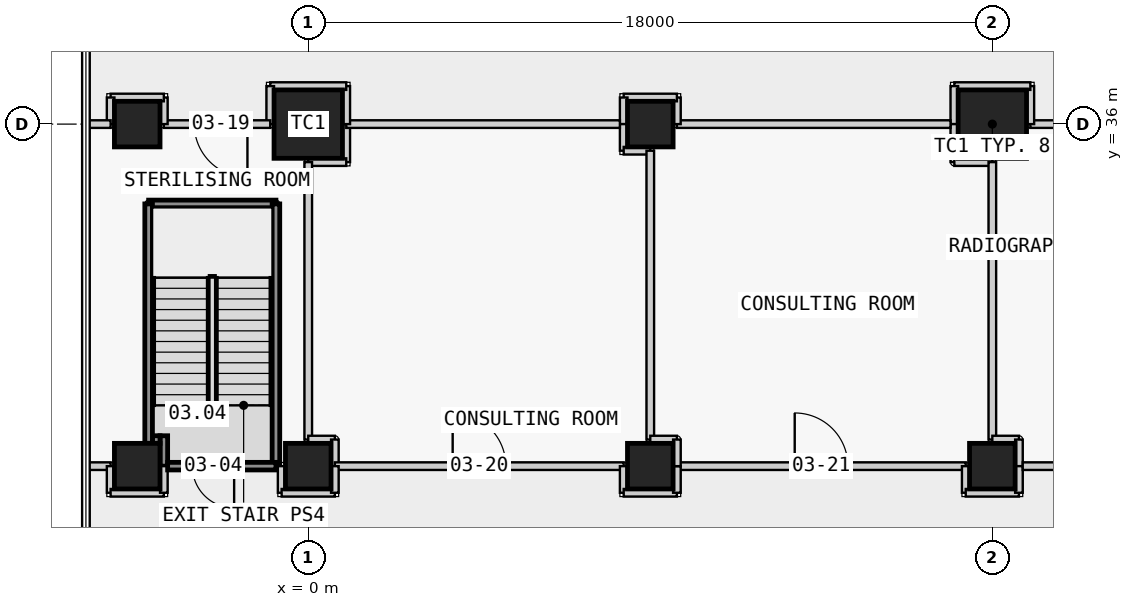
"""IFC4 building model, lengths in metres.
Left out: names, types, materials, properties, quantities, classifications, styles, units other than length and angle.
Written with IfcOpenShell. Run it as: python <this file> out.ifc"""

import sys

from ifc_helpers import new_model, si_unit, direction, frame, frame_2d, origin, origin_2d, place, context, subcontext, project, spatial, rectangle, extrude, element, fill, save


model = new_model("IFC4")
c1 = context("Model", 3, precision=1e-05, world=origin(), true_north=direction((0.0, 1.0)))
c2 = subcontext(c1, "Body", "Model", "MODEL_VIEW")
j1 = project(units=[si_unit("LENGTHUNIT", "METRE"), si_unit("PLANEANGLEUNIT", "RADIAN")], contexts=[c1])
p1 = place(None, origin())
s1 = spatial("IfcSite", under=j1, at=p1, CompositionType="ELEMENT")
p2 = place(p1, origin())
s2 = spatial("IfcBuilding", under=s1, at=p2, CompositionType="ELEMENT")
p3 = place(p2, frame((0.0, 0.0, 17.3)))
s3 = spatial("IfcBuildingStorey", under=s2, at=p3, CompositionType="ELEMENT", Elevation=17.3)
for number, where, z_axis, x_axis in (
    (1, (-4.5, 27.0, 0.0), (0.0, 0.0, 1.0), (1.0, 0.0, 0.0)),
    (2, (-4.5, 36.0, 0.0), (0.0, 0.0, 1.0), (1.0, 0.0, 0.0)),
    (3, (0.0, 27.0, 0.0), (0.0, 0.0, 1.0), (1.0, 0.0, 0.0)),
):
    element("IfcColumn", number, at=place(p3, frame(where, z_axis=z_axis, x_axis=x_axis)), inside=s3, PredefinedType="COLUMN", context=c2, shape_type="SweptSolid", body=[
        extrude(rectangle(XDim=1.2, YDim=1.2, at=origin_2d()), origin(), (0.0, 0.0, 1.0), 4.5),
    ])
p4 = place(p3, frame((0.0, 36.0, 0.0), z_axis=(0.0, 0.0, 1.0), x_axis=(1.0, 0.0, 0.0)))
e4 = element("IfcColumn", 4, at=p4, inside=s3, PredefinedType="COLUMN", context=c2, shape_type="SweptSolid", body=[
    extrude(rectangle(XDim=1.8, YDim=1.8, at=origin_2d()), origin(), (0.0, 0.0, 1.0), 4.5),
])
for number, where, z_axis, x_axis in (
    (5, (9.0, 27.0, 0.0), (0.0, 0.0, 1.0), (1.0, 0.0, 0.0)),
    (6, (9.0, 36.0, 0.0), (0.0, 0.0, 1.0), (1.0, 0.0, 0.0)),
    (7, (18.0, 27.0, 0.0), (0.0, 0.0, 1.0), (1.0, 0.0, 0.0)),
):
    element("IfcColumn", number, at=place(p3, frame(where, z_axis=z_axis, x_axis=x_axis)), inside=s3, PredefinedType="COLUMN", context=c2, shape_type="SweptSolid", body=[
        extrude(rectangle(XDim=1.2, YDim=1.2, at=origin_2d()), origin(), (0.0, 0.0, 1.0), 4.5),
    ])
p5 = place(p3, frame((18.0, 36.0, 0.0), z_axis=(0.0, 0.0, 1.0), x_axis=(1.0, 0.0, 0.0)))
e8 = element("IfcColumn", 8, at=p5, inside=s3, PredefinedType="COLUMN", context=c2, shape_type="SweptSolid", body=[
    extrude(rectangle(XDim=1.8, YDim=1.8, at=origin_2d()), origin(), (0.0, 0.0, 1.0), 4.5),
])
p6 = place(p3, frame((26.3, 36.0, 0.0), z_axis=(0.0, 0.0, 1.0), x_axis=(-1.0, 0.0, 0.0)))
e9 = element("IfcWall", 9, at=p6, inside=s3, PredefinedType="PARTITIONING", context=c2, shape_type="SweptSolid", body=[
    extrude(rectangle(XDim=7.3, YDim=0.2, at=frame_2d((3.65, 0.0))), origin(), (0.0, 0.0, 1.0), 4.15),
])
p7 = place(p6, frame((2.85, 0.0, 0.0)))
e10 = element("IfcOpeningElement", 10, at=p7, cuts=e9, PredefinedType="OPENING", context=c2, shape_type="SweptSolid", body=[
    extrude(rectangle(XDim=1.4, YDim=2.1, at=frame_2d((0.7, 1.05))), frame((0.0, 0.11, 0.0), z_axis=(0.0, -1.0, 0.0), x_axis=(1.0, 0.0, 0.0)), (0.0, 0.0, 1.0), 0.22),
])
p8 = place(p3, frame((19.0, 36.0, 0.0), z_axis=(0.0, 0.0, 1.0), x_axis=(0.0, 1.0, 0.0)))
e11 = element("IfcWall", 11, at=p8, inside=s3, PredefinedType="PARTITIONING", context=c2, shape_type="SweptSolid", body=[
    extrude(rectangle(XDim=1.0, YDim=0.2, at=frame_2d((0.5, 0.0))), origin(), (0.0, 0.0, 1.0), 4.15),
])
p9 = place(p3, frame((19.0, 37.0, 0.0), z_axis=(0.0, 0.0, 1.0), x_axis=(-1.0, 0.0, 0.0)))
e12 = element("IfcWall", 12, at=p9, inside=s3, PredefinedType="PARTITIONING", context=c2, shape_type="SweptSolid", body=[
    extrude(rectangle(XDim=2.0, YDim=0.2, at=frame_2d((1.0, 0.0))), origin(), (0.0, 0.0, 1.0), 4.15),
])
for number, where, z_axis, x_axis in (
    (13, (17.0, 37.0, 0.0), (0.0, 0.0, 1.0), (0.0, -1.0, 0.0)),
    (14, (17.0, 36.0, 0.0), (0.0, 0.0, 1.0), (0.0, -1.0, 0.0)),
    (15, (17.0, 35.0, 0.0), (0.0, 0.0, 1.0), (1.0, 0.0, 0.0)),
):
    element("IfcWall", number, at=place(p3, frame(where, z_axis=z_axis, x_axis=x_axis)), inside=s3, PredefinedType="PARTITIONING", context=c2, shape_type="SweptSolid", body=[
        extrude(rectangle(XDim=1.0, YDim=0.2, at=frame_2d((0.5, 0.0))), origin(), (0.0, 0.0, 1.0), 4.15),
    ])
p10 = place(p3, frame((18.0, 35.0, 0.0), z_axis=(0.0, 0.0, 1.0), x_axis=(0.0, -1.0, 0.0)))
e16 = element("IfcWall", 16, at=p10, inside=s3, PredefinedType="PARTITIONING", context=c2, shape_type="SweptSolid", body=[
    extrude(rectangle(XDim=7.3, YDim=0.2, at=frame_2d((3.65, 0.0))), origin(), (0.0, 0.0, 1.0), 4.15),
])
for number, where, z_axis, x_axis in (
    (17, (18.0, 27.7, 0.0), (0.0, 0.0, 1.0), (1.0, 0.0, 0.0)),
    (18, (18.7, 27.7, 0.0), (0.0, 0.0, 1.0), (0.0, -1.0, 0.0)),
):
    element("IfcWall", number, at=place(p3, frame(where, z_axis=z_axis, x_axis=x_axis)), inside=s3, PredefinedType="PARTITIONING", context=c2, shape_type="SweptSolid", body=[
        extrude(rectangle(XDim=0.7, YDim=0.2, at=frame_2d((0.35, 0.0))), origin(), (0.0, 0.0, 1.0), 4.15),
    ])
for number, where, z_axis, x_axis in (
    (19, (1.0, 36.0, 0.0), (0.0, 0.0, 1.0), (0.0, -1.0, 0.0)),
    (20, (1.0, 35.0, 0.0), (0.0, 0.0, 1.0), (-1.0, 0.0, 0.0)),
):
    element("IfcWall", number, at=place(p3, frame(where, z_axis=z_axis, x_axis=x_axis)), inside=s3, PredefinedType="PARTITIONING", context=c2, shape_type="SweptSolid", body=[
        extrude(rectangle(XDim=1.0, YDim=0.2, at=frame_2d((0.5, 0.0))), origin(), (0.0, 0.0, 1.0), 4.15),
    ])
p11 = place(p3, frame((0.0, 35.0, 0.0), z_axis=(0.0, 0.0, 1.0), x_axis=(0.0, -1.0, 0.0)))
e21 = element("IfcWall", 21, at=p11, inside=s3, PredefinedType="PARTITIONING", context=c2, shape_type="SweptSolid", body=[
    extrude(rectangle(XDim=7.3, YDim=0.2, at=frame_2d((3.65, 0.0))), origin(), (0.0, 0.0, 1.0), 4.15),
])
for number, where, z_axis, x_axis in (
    (22, (0.0, 27.7, 0.0), (0.0, 0.0, 1.0), (1.0, 0.0, 0.0)),
    (23, (0.7, 27.7, 0.0), (0.0, 0.0, 1.0), (0.0, -1.0, 0.0)),
):
    element("IfcWall", number, at=place(p3, frame(where, z_axis=z_axis, x_axis=x_axis)), inside=s3, PredefinedType="PARTITIONING", context=c2, shape_type="SweptSolid", body=[
        extrude(rectangle(XDim=0.7, YDim=0.2, at=frame_2d((0.35, 0.0))), origin(), (0.0, 0.0, 1.0), 4.15),
    ])
p12 = place(p3, frame((9.7, 27.0, 0.0), z_axis=(0.0, 0.0, 1.0), x_axis=(1.0, 0.0, 0.0)))
e24 = element("IfcWall", 24, at=p12, inside=s3, PredefinedType="PARTITIONING", context=c2, shape_type="SweptSolid", body=[
    extrude(rectangle(XDim=7.6, YDim=0.2, at=frame_2d((3.8, 0.0))), origin(), (0.0, 0.0, 1.0), 4.15),
])
p13 = place(p12, frame((3.1, 0.0, 0.0)))
e25 = element("IfcOpeningElement", 25, at=p13, cuts=e24, PredefinedType="OPENING", context=c2, shape_type="SweptSolid", body=[
    extrude(rectangle(XDim=1.4, YDim=2.1, at=frame_2d((0.7, 1.05))), frame((0.0, 0.11, 0.0), z_axis=(0.0, -1.0, 0.0), x_axis=(1.0, 0.0, 0.0)), (0.0, 0.0, 1.0), 0.22),
])
p14 = place(p3, frame((17.3, 27.0, 0.0), z_axis=(0.0, 0.0, 1.0), x_axis=(0.0, -1.0, 0.0)))
e26 = element("IfcWall", 26, at=p14, inside=s3, PredefinedType="PARTITIONING", context=c2, shape_type="SweptSolid", body=[
    extrude(rectangle(XDim=0.7, YDim=0.2, at=frame_2d((0.35, 0.0))), origin(), (0.0, 0.0, 1.0), 4.15),
])
p15 = place(p3, frame((17.3, 26.3, 0.0), z_axis=(0.0, 0.0, 1.0), x_axis=(1.0, 0.0, 0.0)))
e27 = element("IfcWall", 27, at=p15, inside=s3, PredefinedType="PARTITIONING", context=c2, shape_type="SweptSolid", body=[
    extrude(rectangle(XDim=1.4, YDim=0.2, at=frame_2d((0.7, 0.0))), origin(), (0.0, 0.0, 1.0), 4.15),
])
p16 = place(p3, frame((18.7, 26.3, 0.0), z_axis=(0.0, 0.0, 1.0), x_axis=(0.0, 1.0, 0.0)))
e28 = element("IfcWall", 28, at=p16, inside=s3, PredefinedType="PARTITIONING", context=c2, shape_type="SweptSolid", body=[
    extrude(rectangle(XDim=0.7, YDim=0.2, at=frame_2d((0.35, 0.0))), origin(), (0.0, 0.0, 1.0), 4.15),
])
p17 = place(p3, frame((0.7, 27.0, 0.0), z_axis=(0.0, 0.0, 1.0), x_axis=(1.0, 0.0, 0.0)))
e29 = element("IfcWall", 29, at=p17, inside=s3, PredefinedType="PARTITIONING", context=c2, shape_type="SweptSolid", body=[
    extrude(rectangle(XDim=7.6, YDim=0.2, at=frame_2d((3.8, 0.0))), origin(), (0.0, 0.0, 1.0), 4.15),
])
p18 = place(p17, frame((3.1, 0.0, 0.0)))
e30 = element("IfcOpeningElement", 30, at=p18, cuts=e29, PredefinedType="OPENING", context=c2, shape_type="SweptSolid", body=[
    extrude(rectangle(XDim=1.4, YDim=2.1, at=frame_2d((0.7, 1.05))), frame((0.0, 0.11, 0.0), z_axis=(0.0, -1.0, 0.0), x_axis=(1.0, 0.0, 0.0)), (0.0, 0.0, 1.0), 0.22),
])
p19 = place(p3, frame((8.3, 27.0, 0.0), z_axis=(0.0, 0.0, 1.0), x_axis=(0.0, -1.0, 0.0)))
e31 = element("IfcWall", 31, at=p19, inside=s3, PredefinedType="PARTITIONING", context=c2, shape_type="SweptSolid", body=[
    extrude(rectangle(XDim=0.7, YDim=0.2, at=frame_2d((0.35, 0.0))), origin(), (0.0, 0.0, 1.0), 4.15),
])
p20 = place(p3, frame((8.3, 26.3, 0.0), z_axis=(0.0, 0.0, 1.0), x_axis=(1.0, 0.0, 0.0)))
e32 = element("IfcWall", 32, at=p20, inside=s3, PredefinedType="PARTITIONING", context=c2, shape_type="SweptSolid", body=[
    extrude(rectangle(XDim=1.4, YDim=0.2, at=frame_2d((0.7, 0.0))), origin(), (0.0, 0.0, 1.0), 4.15),
])
p21 = place(p3, frame((9.7, 26.3, 0.0), z_axis=(0.0, 0.0, 1.0), x_axis=(0.0, 1.0, 0.0)))
e33 = element("IfcWall", 33, at=p21, inside=s3, PredefinedType="PARTITIONING", context=c2, shape_type="SweptSolid", body=[
    extrude(rectangle(XDim=0.7, YDim=0.2, at=frame_2d((0.35, 0.0))), origin(), (0.0, 0.0, 1.0), 4.15),
])
p22 = place(p3, frame((-4.2, 33.9, 0.0), z_axis=(0.0, 0.0, 1.0), x_axis=(1.0, 0.0, 0.0)))
e34 = element("IfcWall", 34, at=p22, inside=s3, PredefinedType="PARTITIONING", context=c2, shape_type="SweptSolid", body=[
    extrude(rectangle(XDim=3.35, YDim=0.2, at=frame_2d((1.675, 0.0))), origin(), (0.0, 0.0, 1.0), 4.15),
])
p23 = place(p3, frame((-0.85, 33.9, 0.0), z_axis=(0.0, 0.0, 1.0), x_axis=(0.0, -1.0, 0.0)))
e35 = element("IfcWall", 35, at=p23, inside=s3, PredefinedType="PARTITIONING", context=c2, shape_type="SweptSolid", body=[
    extrude(rectangle(XDim=6.9, YDim=0.2, at=frame_2d((3.45, 0.0))), origin(), (0.0, 0.0, 1.0), 4.15),
])
p24 = place(p3, frame((16.9, 36.0, 0.0), z_axis=(0.0, 0.0, 1.0), x_axis=(-1.0, 0.0, 0.0)))
e36 = element("IfcWall", 36, at=p24, inside=s3, PredefinedType="PARTITIONING", context=c2, shape_type="SweptSolid", body=[
    extrude(rectangle(XDim=7.2, YDim=0.2, at=frame_2d((3.6, 0.0))), origin(), (0.0, 0.0, 1.0), 4.15),
])
p25 = place(p3, frame((9.7, 36.0, 0.0), z_axis=(0.0, 0.0, 1.0), x_axis=(0.0, 1.0, 0.0)))
e37 = element("IfcWall", 37, at=p25, inside=s3, PredefinedType="PARTITIONING", context=c2, shape_type="SweptSolid", body=[
    extrude(rectangle(XDim=0.7, YDim=0.2, at=frame_2d((0.35, 0.0))), origin(), (0.0, 0.0, 1.0), 4.15),
])
p26 = place(p3, frame((9.7, 36.7, 0.0), z_axis=(0.0, 0.0, 1.0), x_axis=(-1.0, 0.0, 0.0)))
e38 = element("IfcWall", 38, at=p26, inside=s3, PredefinedType="PARTITIONING", context=c2, shape_type="SweptSolid", body=[
    extrude(rectangle(XDim=1.4, YDim=0.2, at=frame_2d((0.7, 0.0))), origin(), (0.0, 0.0, 1.0), 4.15),
])
for number, where, z_axis, x_axis in (
    (39, (8.3, 36.7, 0.0), (0.0, 0.0, 1.0), (0.0, -1.0, 0.0)),
    (40, (8.3, 36.0, 0.0), (0.0, 0.0, 1.0), (0.0, -1.0, 0.0)),
    (41, (8.3, 35.3, 0.0), (0.0, 0.0, 1.0), (1.0, 0.0, 0.0)),
):
    element("IfcWall", number, at=place(p3, frame(where, z_axis=z_axis, x_axis=x_axis)), inside=s3, PredefinedType="PARTITIONING", context=c2, shape_type="SweptSolid", body=[
        extrude(rectangle(XDim=0.7, YDim=0.2, at=frame_2d((0.35, 0.0))), origin(), (0.0, 0.0, 1.0), 4.15),
    ])
p27 = place(p3, frame((9.0, 35.3, 0.0), z_axis=(0.0, 0.0, 1.0), x_axis=(0.0, -1.0, 0.0)))
e42 = element("IfcWall", 42, at=p27, inside=s3, PredefinedType="PARTITIONING", context=c2, shape_type="SweptSolid", body=[
    extrude(rectangle(XDim=7.6, YDim=0.2, at=frame_2d((3.8, 0.0))), origin(), (0.0, 0.0, 1.0), 4.15),
])
p28 = place(p3, frame((18.8, 27.0, 0.0), z_axis=(0.0, 0.0, 1.0), x_axis=(1.0, 0.0, 0.0)))
e43 = element("IfcWall", 43, at=p28, inside=s3, PredefinedType="PARTITIONING", context=c2, shape_type="SweptSolid", body=[
    extrude(rectangle(XDim=7.5, YDim=0.2, at=frame_2d((3.75, 0.0))), origin(), (0.0, 0.0, 1.0), 4.15),
])
p29 = place(p3, frame((8.2, 36.0, 0.0), z_axis=(0.0, 0.0, 1.0), x_axis=(-1.0, 0.0, 0.0)))
e44 = element("IfcWall", 44, at=p29, inside=s3, PredefinedType="PARTITIONING", context=c2, shape_type="SweptSolid", body=[
    extrude(rectangle(XDim=7.2, YDim=0.2, at=frame_2d((3.6, 0.0))), origin(), (0.0, 0.0, 1.0), 4.15),
])
p30 = place(p3, frame((-3.8, 27.0, 0.0), z_axis=(0.0, 0.0, 1.0), x_axis=(0.0, 1.0, 0.0)))
e45 = element("IfcWall", 45, at=p30, inside=s3, PredefinedType="PARTITIONING", context=c2, shape_type="SweptSolid", body=[
    extrude(rectangle(XDim=0.8, YDim=0.2, at=frame_2d((0.4, 0.0))), origin(), (0.0, 0.0, 1.0), 4.15),
])
p31 = place(p3, frame((-3.9, 27.7, 0.0), z_axis=(0.0, 0.0, 1.0), x_axis=(-1.0, 0.0, 0.0)))
e46 = element("IfcWall", 46, at=p31, inside=s3, PredefinedType="PARTITIONING", context=c2, shape_type="SweptSolid", body=[
    extrude(rectangle(XDim=0.2, YDim=0.2, at=frame_2d((0.1, 0.0))), origin(), (0.0, 0.0, 1.0), 4.15),
])
p32 = place(p3, frame((-4.2, 27.6, 0.0), z_axis=(0.0, 0.0, 1.0), x_axis=(0.0, 1.0, 0.0)))
e47 = element("IfcWall", 47, at=p32, inside=s3, PredefinedType="PARTITIONING", context=c2, shape_type="SweptSolid", body=[
    extrude(rectangle(XDim=6.3, YDim=0.2, at=frame_2d((3.15, 0.0))), origin(), (0.0, 0.0, 1.0), 4.15),
])
p33 = place(p3, frame((1.0, 36.0, 0.0), z_axis=(0.0, 0.0, 1.0), x_axis=(0.0, 1.0, 0.0)))
e48 = element("IfcWall", 48, at=p33, inside=s3, PredefinedType="PARTITIONING", context=c2, shape_type="SweptSolid", body=[
    extrude(rectangle(XDim=1.0, YDim=0.2, at=frame_2d((0.5, 0.0))), origin(), (0.0, 0.0, 1.0), 4.15),
])
p34 = place(p3, frame((1.0, 37.0, 0.0), z_axis=(0.0, 0.0, 1.0), x_axis=(-1.0, 0.0, 0.0)))
e49 = element("IfcWall", 49, at=p34, inside=s3, PredefinedType="PARTITIONING", context=c2, shape_type="SweptSolid", body=[
    extrude(rectangle(XDim=2.0, YDim=0.2, at=frame_2d((1.0, 0.0))), origin(), (0.0, 0.0, 1.0), 4.15),
])
p35 = place(p3, frame((-1.0, 37.0, 0.0), z_axis=(0.0, 0.0, 1.0), x_axis=(0.0, -1.0, 0.0)))
e50 = element("IfcWall", 50, at=p35, inside=s3, PredefinedType="PARTITIONING", context=c2, shape_type="SweptSolid", body=[
    extrude(rectangle(XDim=1.0, YDim=0.2, at=frame_2d((0.5, 0.0))), origin(), (0.0, 0.0, 1.0), 4.15),
])
p36 = place(p3, frame((-1.0, 36.0, 0.0), z_axis=(0.0, 0.0, 1.0), x_axis=(-1.0, 0.0, 0.0)))
e51 = element("IfcWall", 51, at=p36, inside=s3, PredefinedType="PARTITIONING", context=c2, shape_type="SweptSolid", body=[
    extrude(rectangle(XDim=2.8, YDim=0.2, at=frame_2d((1.4, 0.0))), origin(), (0.0, 0.0, 1.0), 4.15),
])
p37 = place(p36, frame((0.6, 0.0, 0.0)))
e52 = element("IfcOpeningElement", 52, at=p37, cuts=e51, PredefinedType="OPENING", context=c2, shape_type="SweptSolid", body=[
    extrude(rectangle(XDim=1.4, YDim=2.1, at=frame_2d((0.7, 1.05))), frame((0.0, 0.11, 0.0), z_axis=(0.0, -1.0, 0.0), x_axis=(1.0, 0.0, 0.0)), (0.0, 0.0, 1.0), 0.22),
])
p38 = place(p3, frame((-5.85, 27.0, 0.0), z_axis=(0.0, 0.0, 1.0), x_axis=(1.0, 0.0, 0.0)))
e53 = element("IfcWall", 53, at=p38, inside=s3, PredefinedType="PARTITIONING", context=c2, shape_type="SweptSolid", body=[
    extrude(rectangle(XDim=0.65, YDim=0.2, at=frame_2d((0.325, 0.0))), origin(), (0.0, 0.0, 1.0), 4.15),
])
p39 = place(p3, frame((-5.2, 27.0, 0.0), z_axis=(0.0, 0.0, 1.0), x_axis=(0.0, -1.0, 0.0)))
e54 = element("IfcWall", 54, at=p39, inside=s3, PredefinedType="PARTITIONING", context=c2, shape_type="SweptSolid", body=[
    extrude(rectangle(XDim=0.7, YDim=0.2, at=frame_2d((0.35, 0.0))), origin(), (0.0, 0.0, 1.0), 4.15),
])
p40 = place(p3, frame((-5.2, 26.3, 0.0), z_axis=(0.0, 0.0, 1.0), x_axis=(1.0, 0.0, 0.0)))
e55 = element("IfcWall", 55, at=p40, inside=s3, PredefinedType="PARTITIONING", context=c2, shape_type="SweptSolid", body=[
    extrude(rectangle(XDim=1.4, YDim=0.2, at=frame_2d((0.7, 0.0))), origin(), (0.0, 0.0, 1.0), 4.15),
])
for number, where, z_axis, x_axis in (
    (56, (-3.8, 26.3, 0.0), (0.0, 0.0, 1.0), (0.0, 1.0, 0.0)),
    (57, (-3.8, 36.0, 0.0), (0.0, 0.0, 1.0), (0.0, 1.0, 0.0)),
):
    element("IfcWall", number, at=place(p3, frame(where, z_axis=z_axis, x_axis=x_axis)), inside=s3, PredefinedType="PARTITIONING", context=c2, shape_type="SweptSolid", body=[
        extrude(rectangle(XDim=0.7, YDim=0.2, at=frame_2d((0.35, 0.0))), origin(), (0.0, 0.0, 1.0), 4.15),
    ])
p41 = place(p3, frame((-3.8, 36.7, 0.0), z_axis=(0.0, 0.0, 1.0), x_axis=(-1.0, 0.0, 0.0)))
e58 = element("IfcWall", 58, at=p41, inside=s3, PredefinedType="PARTITIONING", context=c2, shape_type="SweptSolid", body=[
    extrude(rectangle(XDim=1.4, YDim=0.2, at=frame_2d((0.7, 0.0))), origin(), (0.0, 0.0, 1.0), 4.15),
])
p42 = place(p3, frame((-5.2, 36.7, 0.0), z_axis=(0.0, 0.0, 1.0), x_axis=(0.0, -1.0, 0.0)))
e59 = element("IfcWall", 59, at=p42, inside=s3, PredefinedType="PARTITIONING", context=c2, shape_type="SweptSolid", body=[
    extrude(rectangle(XDim=0.7, YDim=0.2, at=frame_2d((0.35, 0.0))), origin(), (0.0, 0.0, 1.0), 4.15),
])
p43 = place(p3, frame((-5.2, 36.0, 0.0), z_axis=(0.0, 0.0, 1.0), x_axis=(-1.0, 0.0, 0.0)))
e60 = element("IfcWall", 60, at=p43, inside=s3, PredefinedType="PARTITIONING", context=c2, shape_type="SweptSolid", body=[
    extrude(rectangle(XDim=0.65, YDim=0.2, at=frame_2d((0.325, 0.0))), origin(), (0.0, 0.0, 1.0), 4.15),
])
p44 = place(p3, frame((-0.85, 27.0, 0.0), z_axis=(0.0, 0.0, 1.0), x_axis=(-1.0, 0.0, 0.0)))
e61 = element("IfcWall", 61, at=p44, inside=s3, PredefinedType="PARTITIONING", context=c2, shape_type="SweptSolid", body=[
    extrude(rectangle(XDim=2.85, YDim=0.2, at=frame_2d((1.425, 0.0))), origin(), (0.0, 0.0, 1.0), 4.15),
])
p45 = place(p44, frame((1.1, 0.0, 0.0)))
e62 = element("IfcOpeningElement", 62, at=p45, cuts=e61, PredefinedType="OPENING", context=c2, shape_type="SweptSolid", body=[
    extrude(rectangle(XDim=1.1, YDim=2.1, at=frame_2d((0.55, 1.05))), frame((0.0, 0.11, 0.0), z_axis=(0.0, -1.0, 0.0), x_axis=(1.0, 0.0, 0.0)), (0.0, 0.0, 1.0), 0.22),
])
p46 = place(p3, frame((-0.7, 27.0, 0.0), z_axis=(0.0, 0.0, 1.0), x_axis=(0.0, -1.0, 0.0)))
e63 = element("IfcWall", 63, at=p46, inside=s3, PredefinedType="PARTITIONING", context=c2, shape_type="SweptSolid", body=[
    extrude(rectangle(XDim=0.7, YDim=0.2, at=frame_2d((0.35, 0.0))), origin(), (0.0, 0.0, 1.0), 4.15),
])
p47 = place(p3, frame((-0.7, 26.3, 0.0), z_axis=(0.0, 0.0, 1.0), x_axis=(1.0, 0.0, 0.0)))
e64 = element("IfcWall", 64, at=p47, inside=s3, PredefinedType="PARTITIONING", context=c2, shape_type="SweptSolid", body=[
    extrude(rectangle(XDim=1.4, YDim=0.2, at=frame_2d((0.7, 0.0))), origin(), (0.0, 0.0, 1.0), 4.15),
])
for number, where, z_axis, x_axis in (
    (65, (9.0, 27.7, 0.0), (0.0, 0.0, 1.0), (1.0, 0.0, 0.0)),
    (66, (9.7, 27.7, 0.0), (0.0, 0.0, 1.0), (0.0, -1.0, 0.0)),
    (67, (0.7, 26.3, 0.0), (0.0, 0.0, 1.0), (0.0, 1.0, 0.0)),
):
    element("IfcWall", number, at=place(p3, frame(where, z_axis=z_axis, x_axis=x_axis)), inside=s3, PredefinedType="PARTITIONING", context=c2, shape_type="SweptSolid", body=[
        extrude(rectangle(XDim=0.7, YDim=0.2, at=frame_2d((0.35, 0.0))), origin(), (0.0, 0.0, 1.0), 4.15),
    ])
p48 = place(p45, origin())
e68 = element("IfcDoor", 68, at=p48, inside=s3, OperationType="SINGLE_SWING_LEFT", PredefinedType="DOOR", context=c2, shape_type="SweptSolid", body=[
    extrude(rectangle(XDim=1.1, YDim=2.1, at=frame_2d((0.55, 1.05))), frame((0.0, 0.025, 0.0), z_axis=(0.0, -1.0, 0.0), x_axis=(1.0, 0.0, 0.0)), (0.0, 0.0, 1.0), 0.05),
])
fill(e62, e68)
p49 = place(p37, origin())
e69 = element("IfcDoor", 69, at=p49, inside=s3, OperationType="SINGLE_SWING_LEFT", PredefinedType="DOOR", context=c2, shape_type="SweptSolid", body=[
    extrude(rectangle(XDim=1.4, YDim=2.1, at=frame_2d((0.7, 1.05))), frame((0.0, 0.025, 0.0), z_axis=(0.0, -1.0, 0.0), x_axis=(1.0, 0.0, 0.0)), (0.0, 0.0, 1.0), 0.05),
])
fill(e52, e69)
p50 = place(p18, origin())
e70 = element("IfcDoor", 70, at=p50, inside=s3, OperationType="SINGLE_SWING_LEFT", PredefinedType="DOOR", context=c2, shape_type="SweptSolid", body=[
    extrude(rectangle(XDim=1.4, YDim=2.1, at=frame_2d((0.7, 1.05))), frame((0.0, 0.025, 0.0), z_axis=(0.0, -1.0, 0.0), x_axis=(1.0, 0.0, 0.0)), (0.0, 0.0, 1.0), 0.05),
])
fill(e30, e70)
p51 = place(p13, origin())
e71 = element("IfcDoor", 71, at=p51, inside=s3, OperationType="SINGLE_SWING_LEFT", PredefinedType="DOOR", context=c2, shape_type="SweptSolid", body=[
    extrude(rectangle(XDim=1.4, YDim=2.1, at=frame_2d((0.7, 1.05))), frame((0.0, 0.025, 0.0), z_axis=(0.0, -1.0, 0.0), x_axis=(1.0, 0.0, 0.0)), (0.0, 0.0, 1.0), 0.05),
])
fill(e25, e71)
save(model, sys.argv[1])
